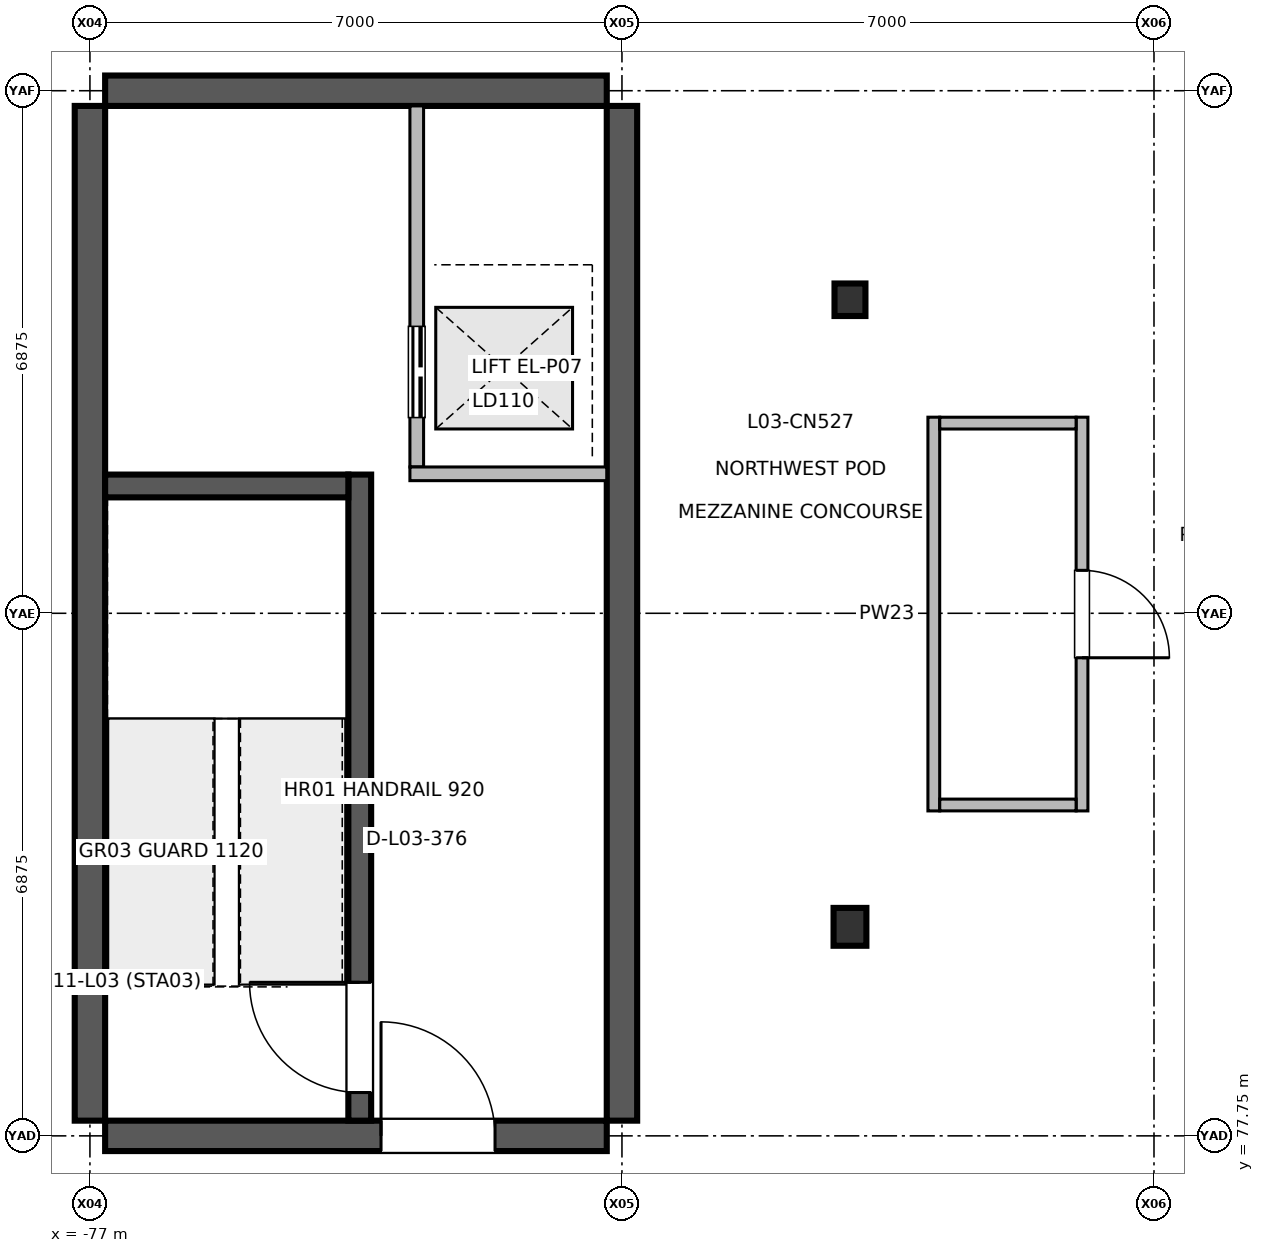
"""IFC4 building model, lengths in metres.
Left out: names, types, materials, properties, quantities, classifications, styles, units other than length and angle.
Written with IfcOpenShell. Run it as: python <this file> out.ifc"""

import sys

from ifc_helpers import new_model, si_unit, direction, frame, frame_2d, origin, origin_2d, place, context, subcontext, project, spatial, rectangle, i_section, extrude, element, fill, save


model = new_model("IFC4")
c1 = context("Model", 3, precision=1e-05, world=origin(), true_north=direction((0.0, 1.0)))
c2 = subcontext(c1, "Body", "Model", "MODEL_VIEW")
j1 = project(units=[si_unit("LENGTHUNIT", "METRE"), si_unit("PLANEANGLEUNIT", "RADIAN")], contexts=[c1])
p1 = place(None, origin())
s1 = spatial("IfcSite", under=j1, at=p1, CompositionType="ELEMENT")
p2 = place(p1, origin())
s2 = spatial("IfcBuilding", under=s1, at=p2, CompositionType="ELEMENT")
p3 = place(p2, frame((0.0, 0.0, 11.4)))
s3 = spatial("IfcBuildingStorey", under=s2, at=p3, CompositionType="ELEMENT", Elevation=11.4)
p4 = place(p3, frame((-67.0, 80.5, 0.0), z_axis=(0.0, 0.0, 1.0), x_axis=(1.0, 0.0, 0.0)))
e1 = element("IfcColumn", 1, at=p4, inside=s3, PredefinedType="COLUMN", context=c2, shape_type="SweptSolid", body=[
    extrude(i_section(OverallWidth=0.432, OverallDepth=0.498, WebThickness=0.024, FlangeThickness=0.038, at=origin_2d()), origin(), (0.0, 0.0, 1.0), 4.798),
])
p5 = place(p3, frame((-67.0, 88.75, 0.0), z_axis=(0.0, 0.0, 1.0), x_axis=(1.0, 0.0, 0.0)))
e2 = element("IfcColumn", 2, at=p5, inside=s3, PredefinedType="COLUMN", context=c2, shape_type="SweptSolid", body=[
    extrude(i_section(OverallWidth=0.407, OverallDepth=0.428, WebThickness=0.02, FlangeThickness=0.035, at=origin_2d()), origin(), (0.0, 0.0, 1.0), 4.798),
])
for number, where, z_axis, x_axis in (
    (3, (-77.0, 77.95, 0.0), (0.0, 0.0, 1.0), (0.0, 1.0, 0.0)),
    (4, (-70.0, 77.95, 0.0), (0.0, 0.0, 1.0), (0.0, 1.0, 0.0)),
):
    element("IfcWall", number, at=place(p3, frame(where, z_axis=z_axis, x_axis=x_axis)), inside=s3, PredefinedType="SHEAR", context=c2, shape_type="SweptSolid", body=[
        extrude(rectangle(XDim=13.35, YDim=0.4, at=frame_2d((6.675, 0.0))), origin(), (0.0, 0.0, 1.0), 4.48),
    ])
p6 = place(p3, frame((-76.8, 77.75, 0.0), z_axis=(0.0, 0.0, 1.0), x_axis=(1.0, 0.0, 0.0)))
e5 = element("IfcWall", 5, at=p6, inside=s3, PredefinedType="SHEAR", context=c2, shape_type="SweptSolid", body=[
    extrude(rectangle(XDim=6.6, YDim=0.4, at=frame_2d((3.3, 0.0))), origin(), (0.0, 0.0, 1.0), 4.48),
])
p7 = place(p6, frame((3.63, 0.0, 0.0)))
e6 = element("IfcOpeningElement", 6, at=p7, cuts=e5, PredefinedType="OPENING", context=c2, shape_type="SweptSolid", body=[
    extrude(rectangle(XDim=1.5, YDim=2.2, at=frame_2d((0.75, 1.1))), frame((0.0, 0.21, 0.0), z_axis=(0.0, -1.0, 0.0), x_axis=(1.0, 0.0, 0.0)), (0.0, 0.0, 1.0), 0.42),
])
p8 = place(p3, frame((-76.8, 91.5, 0.0), z_axis=(0.0, 0.0, 1.0), x_axis=(1.0, 0.0, 0.0)))
e7 = element("IfcWall", 7, at=p8, inside=s3, PredefinedType="SHEAR", context=c2, shape_type="SweptSolid", body=[
    extrude(rectangle(XDim=6.6, YDim=0.4, at=frame_2d((3.3, 0.0))), origin(), (0.0, 0.0, 1.0), 4.48),
])
p9 = place(p3, frame((-73.45, 77.95, 0.0), z_axis=(0.0, 0.0, 1.0), x_axis=(0.0, 1.0, 0.0)))
e8 = element("IfcWall", 8, at=p9, inside=s3, PredefinedType="SHEAR", context=c2, shape_type="SweptSolid", body=[
    extrude(rectangle(XDim=8.5, YDim=0.3, at=frame_2d((4.25, 0.0))), origin(), (0.0, 0.0, 1.0), 4.48),
])
p10 = place(p9, frame((0.37, 0.0, 0.0)))
e9 = element("IfcOpeningElement", 9, at=p10, cuts=e8, PredefinedType="OPENING", context=c2, shape_type="SweptSolid", body=[
    extrude(rectangle(XDim=1.45, YDim=2.2, at=frame_2d((0.725, 1.1))), frame((0.0, 0.16, 0.0), z_axis=(0.0, -1.0, 0.0), x_axis=(1.0, 0.0, 0.0)), (0.0, 0.0, 1.0), 0.32),
])
p11 = place(p3, frame((-72.7, 86.55, 0.0), z_axis=(0.0, 0.0, 1.0), x_axis=(0.0, 1.0, 0.0)))
e10 = element("IfcWall", 10, at=p11, inside=s3, PredefinedType="PARTITIONING", context=c2, shape_type="SweptSolid", body=[
    extrude(rectangle(XDim=4.75, YDim=0.18, at=frame_2d((2.375, 0.0))), origin(), (0.0, 0.0, 1.0), 3.655),
])
p12 = place(p11, frame((0.65, 0.0, 0.0)))
e11 = element("IfcOpeningElement", 11, at=p12, cuts=e10, PredefinedType="OPENING", context=c2, shape_type="SweptSolid", body=[
    extrude(rectangle(XDim=1.2, YDim=2.25, at=frame_2d((0.6, 1.125))), frame((0.0, 0.1, 0.0), z_axis=(0.0, -1.0, 0.0), x_axis=(1.0, 0.0, 0.0)), (0.0, 0.0, 1.0), 0.2),
])
p13 = place(p3, frame((-63.947, 87.205, 0.0), z_axis=(0.0, 0.0, 1.0), x_axis=(0.0, -1.0, 0.0)))
e12 = element("IfcWall", 12, at=p13, inside=s3, PredefinedType="PARTITIONING", context=c2, shape_type="SweptSolid", body=[
    extrude(rectangle(XDim=5.18, YDim=0.155, at=frame_2d((2.59, 0.0))), origin(), (0.0, 0.0, 1.0), 3.555),
])
p14 = place(p13, frame((2.015, 0.0, 0.0)))
e13 = element("IfcOpeningElement", 13, at=p14, cuts=e12, PredefinedType="OPENING", context=c2, shape_type="SweptSolid", body=[
    extrude(rectangle(XDim=1.15, YDim=2.2, at=frame_2d((0.575, 1.1))), frame((0.0, 0.087, 0.0), z_axis=(0.0, -1.0, 0.0), x_axis=(1.0, 0.0, 0.0)), (0.0, 0.0, 1.0), 0.175),
])
p15 = place(p3, frame((-72.79, 86.46, 0.0), z_axis=(0.0, 0.0, 1.0), x_axis=(1.0, 0.0, 0.0)))
e14 = element("IfcWall", 14, at=p15, inside=s3, PredefinedType="PARTITIONING", context=c2, shape_type="SweptSolid", body=[
    extrude(rectangle(XDim=2.59, YDim=0.18, at=frame_2d((1.295, 0.0))), origin(), (0.0, 0.0, 1.0), 3.82),
])
p16 = place(p3, frame((-65.897, 82.025, 0.0), z_axis=(0.0, 0.0, 1.0), x_axis=(0.0, 1.0, 0.0)))
e15 = element("IfcWall", 15, at=p16, inside=s3, PredefinedType="PARTITIONING", context=c2, shape_type="SweptSolid", body=[
    extrude(rectangle(XDim=5.18, YDim=0.155, at=frame_2d((2.59, 0.0))), origin(), (0.0, 0.0, 1.0), 3.555),
])
p17 = place(p3, frame((-65.819, 82.103, 0.0), z_axis=(0.0, 0.0, 1.0), x_axis=(1.0, 0.0, 0.0)))
e16 = element("IfcWall", 16, at=p17, inside=s3, PredefinedType="PARTITIONING", context=c2, shape_type="SweptSolid", body=[
    extrude(rectangle(XDim=1.794, YDim=0.155, at=frame_2d((0.897, 0.0))), origin(), (0.0, 0.0, 1.0), 3.555),
])
p18 = place(p3, frame((-65.819, 87.127, 0.0), z_axis=(0.0, 0.0, 1.0), x_axis=(1.0, 0.0, 0.0)))
e17 = element("IfcWall", 17, at=p18, inside=s3, PredefinedType="PARTITIONING", context=c2, shape_type="SweptSolid", body=[
    extrude(rectangle(XDim=1.794, YDim=0.155, at=frame_2d((0.897, 0.0))), origin(), (0.0, 0.0, 1.0), 3.82),
])
p19 = place(p3, frame((-76.8, 86.3, 0.0), z_axis=(0.0, 0.0, 1.0), x_axis=(1.0, 0.0, 0.0)))
e18 = element("IfcWall", 18, at=p19, inside=s3, PredefinedType="SHEAR", context=c2, shape_type="SweptSolid", body=[
    extrude(rectangle(XDim=3.2, YDim=0.3, at=frame_2d((1.6, 0.0))), origin(), (0.0, 0.0, 1.0), 4.48),
])
p20 = place(p7, origin())
e19 = element("IfcDoor", 19, at=p20, inside=s3, OperationType="SINGLE_SWING_LEFT", PredefinedType="DOOR", context=c2, shape_type="SweptSolid", body=[
    extrude(rectangle(XDim=1.5, YDim=2.2, at=frame_2d((0.75, 1.1))), frame((0.0, 0.025, 0.0), z_axis=(0.0, -1.0, 0.0), x_axis=(1.0, 0.0, 0.0)), (0.0, 0.0, 1.0), 0.05),
])
fill(e6, e19)
p21 = place(p10, origin())
e20 = element("IfcDoor", 20, at=p21, inside=s3, OperationType="SINGLE_SWING_RIGHT", PredefinedType="DOOR", context=c2, shape_type="SweptSolid", body=[
    extrude(rectangle(XDim=1.45, YDim=2.2, at=frame_2d((0.725, 1.1))), frame((0.0, 0.025, 0.0), z_axis=(0.0, -1.0, 0.0), x_axis=(1.0, 0.0, 0.0)), (0.0, 0.0, 1.0), 0.05),
])
fill(e9, e20)
p22 = place(p12, origin())
e21 = element("IfcDoor", 21, at=p22, inside=s3, OperationType="DOUBLE_DOOR_SLIDING", PredefinedType="DOOR", context=c2, shape_type="SweptSolid", body=[
    extrude(rectangle(XDim=1.2, YDim=2.25, at=frame_2d((0.6, 1.125))), frame((0.0, 0.025, 0.0), z_axis=(0.0, -1.0, 0.0), x_axis=(1.0, 0.0, 0.0)), (0.0, 0.0, 1.0), 0.05),
])
fill(e11, e21)
p23 = place(p14, origin())
e22 = element("IfcDoor", 22, at=p23, inside=s3, OperationType="SINGLE_SWING_RIGHT", PredefinedType="DOOR", context=c2, shape_type="SweptSolid", body=[
    extrude(rectangle(XDim=1.15, YDim=2.2, at=frame_2d((0.575, 1.1))), frame((0.0, 0.025, 0.0), z_axis=(0.0, -1.0, 0.0), x_axis=(1.0, 0.0, 0.0)), (0.0, 0.0, 1.0), 0.05),
])
fill(e13, e22)
save(model, sys.argv[1])
